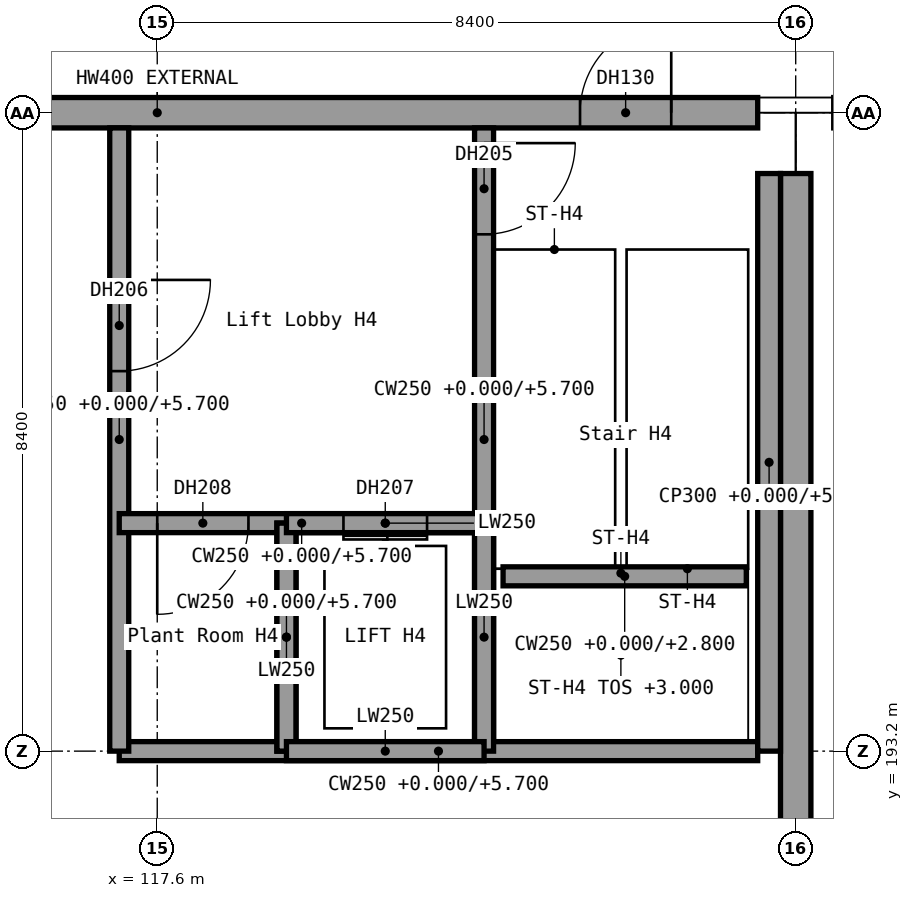
"""IFC4 building model, lengths in metres.
Left out: names, types, materials, properties, quantities, classifications, styles, units other than length and angle.
Written with IfcOpenShell. Run it as: python <this file> out.ifc"""

import sys

from ifc_helpers import new_model, si_unit, direction, frame, frame_2d, origin, origin_2d, place, context, subcontext, project, spatial, rectangle, extrude, element, fill, save


model = new_model("IFC4")
c1 = context("Model", 3, precision=1e-05, world=origin(), true_north=direction((0.0, 1.0)))
c2 = subcontext(c1, "Body", "Model", "MODEL_VIEW")
j1 = project(units=[si_unit("LENGTHUNIT", "METRE"), si_unit("PLANEANGLEUNIT", "RADIAN")], contexts=[c1])
p1 = place(None, origin())
s1 = spatial("IfcSite", under=j1, at=p1, CompositionType="ELEMENT")
p2 = place(p1, origin())
s2 = spatial("IfcBuilding", under=s1, at=p2, CompositionType="ELEMENT")
p3 = place(p2, origin())
s3 = spatial("IfcBuildingStorey", under=s2, at=p3, CompositionType="ELEMENT", Elevation=0.0)
p4 = place(p3, frame((126.0, 201.6, 0.0), z_axis=(0.0, 0.0, 1.0), x_axis=(1.0, 0.0, 0.0)))
e1 = element("IfcColumn", 1, at=p4, inside=s3, PredefinedType="COLUMN", context=c2, shape_type="SweptSolid", body=[
    extrude(rectangle(XDim=1.0, YDim=1.6, at=origin_2d()), origin(), (0.0, 0.0, 1.0), 6.0),
])
p5 = place(p3, frame((109.7, 201.6, 0.0), z_axis=(0.0, 0.0, 1.0), x_axis=(1.0, 0.0, 0.0)))
e2 = element("IfcWall", 2, at=p5, inside=s3, PredefinedType="STANDARD", context=c2, shape_type="SweptSolid", body=[
    extrude(rectangle(XDim=15.8, YDim=0.4, at=frame_2d((7.9, 0.0))), origin(), (0.0, 0.0, 1.0), 4.5),
])
p6 = place(p5, frame((13.462, 0.0, 0.0)))
e3 = element("IfcOpeningElement", 3, at=p6, cuts=e2, PredefinedType="OPENING", context=c2, shape_type="SweptSolid", body=[
    extrude(rectangle(XDim=1.2, YDim=2.1, at=frame_2d((0.6, 1.05))), frame((0.0, 0.2, 0.0), z_axis=(0.0, -1.0, 0.0), x_axis=(1.0, 0.0, 0.0)), (0.0, 0.0, 1.0), 0.4),
])
p7 = place(p5, frame((1.4, 0.0, 0.0)))
e4 = element("IfcOpeningElement", 4, at=p7, cuts=e2, PredefinedType="OPENING", context=c2, shape_type="SweptSolid", body=[
    extrude(rectangle(XDim=3.0, YDim=2.4, at=frame_2d((1.5, 1.2))), frame((0.0, 0.2, 0.0), z_axis=(0.0, -1.0, 0.0), x_axis=(1.0, 0.0, 0.0)), (0.0, 0.0, 1.0), 0.4),
])
p8 = place(p3, frame((126.0, 101.6, 0.0), z_axis=(0.0, 0.0, 1.0), x_axis=(0.0, 1.0, 0.0)))
e5 = element("IfcWall", 5, at=p8, inside=s3, PredefinedType="SHEAR", context=c2, shape_type="SweptSolid", body=[
    extrude(rectangle(XDim=99.2, YDim=0.4, at=frame_2d((49.6, 0.0))), origin(), (0.0, 0.0, 1.0), 6.0),
])
p9 = place(p8, frame((19.2, 0.0, 0.0)))
e6 = element("IfcOpeningElement", 6, at=p9, cuts=e5, PredefinedType="OPENING", context=c2, shape_type="SweptSolid", body=[
    extrude(rectangle(XDim=2.4, YDim=2.4, at=frame_2d((1.2, 1.2))), frame((0.0, 0.2, 0.0), z_axis=(0.0, -1.0, 0.0), x_axis=(1.0, 0.0, 0.0)), (0.0, 0.0, 1.0), 0.4),
])
p10 = place(p8, frame((39.2, 0.0, 0.0)))
e7 = element("IfcOpeningElement", 7, at=p10, cuts=e5, PredefinedType="OPENING", context=c2, shape_type="SweptSolid", body=[
    extrude(rectangle(XDim=2.4, YDim=2.4, at=frame_2d((1.2, 1.2))), frame((0.0, 0.2, 0.0), z_axis=(0.0, -1.0, 0.0), x_axis=(1.0, 0.0, 0.0)), (0.0, 0.0, 1.0), 0.4),
])
p11 = place(p8, frame((57.2, 0.0, 0.0)))
e8 = element("IfcOpeningElement", 8, at=p11, cuts=e5, PredefinedType="OPENING", context=c2, shape_type="SweptSolid", body=[
    extrude(rectangle(XDim=2.4, YDim=2.4, at=frame_2d((1.2, 1.2))), frame((0.0, 0.2, 0.0), z_axis=(0.0, -1.0, 0.0), x_axis=(1.0, 0.0, 0.0)), (0.0, 0.0, 1.0), 0.4),
])
p12 = place(p8, frame((77.2, 0.0, 0.0)))
e9 = element("IfcOpeningElement", 9, at=p12, cuts=e5, PredefinedType="OPENING", context=c2, shape_type="SweptSolid", body=[
    extrude(rectangle(XDim=2.4, YDim=2.4, at=frame_2d((1.2, 1.2))), frame((0.0, 0.2, 0.0), z_axis=(0.0, -1.0, 0.0), x_axis=(1.0, 0.0, 0.0)), (0.0, 0.0, 1.0), 0.4),
])
p13 = place(p3, frame((126.5, 201.6, 0.0), z_axis=(0.0, 0.0, 1.0), x_axis=(1.0, 0.0, 0.0)))
e10 = element("IfcWall", 10, at=p13, inside=s3, PredefinedType="SHEAR", context=c2, shape_type="SweptSolid", body=[
    extrude(rectangle(XDim=15.8, YDim=0.4, at=frame_2d((7.9, 0.0))), origin(), (0.0, 0.0, 1.0), 3.0),
])
p14 = place(p13, frame((2.5, 0.0, 0.0)))
e11 = element("IfcOpeningElement", 11, at=p14, cuts=e10, PredefinedType="OPENING", context=c2, shape_type="SweptSolid", body=[
    extrude(rectangle(XDim=2.4, YDim=2.4, at=frame_2d((1.2, 1.2))), frame((0.0, 0.2, 0.0), z_axis=(0.0, -1.0, 0.0), x_axis=(1.0, 0.0, 0.0)), (0.0, 0.0, 1.0), 0.4),
])
p15 = place(p13, frame((6.7, 0.0, 0.0)))
e12 = element("IfcOpeningElement", 12, at=p15, cuts=e10, PredefinedType="OPENING", context=c2, shape_type="SweptSolid", body=[
    extrude(rectangle(XDim=2.4, YDim=2.4, at=frame_2d((1.2, 1.2))), frame((0.0, 0.2, 0.0), z_axis=(0.0, -1.0, 0.0), x_axis=(1.0, 0.0, 0.0)), (0.0, 0.0, 1.0), 0.4),
])
p16 = place(p13, frame((10.9, 0.0, 0.0)))
e13 = element("IfcOpeningElement", 13, at=p16, cuts=e10, PredefinedType="OPENING", context=c2, shape_type="SweptSolid", body=[
    extrude(rectangle(XDim=2.4, YDim=2.4, at=frame_2d((1.2, 1.2))), frame((0.0, 0.2, 0.0), z_axis=(0.0, -1.0, 0.0), x_axis=(1.0, 0.0, 0.0)), (0.0, 0.0, 1.0), 0.4),
])
p17 = place(p3, frame((121.9, 201.4, 0.0), z_axis=(0.0, 0.0, 1.0), x_axis=(0.0, -1.0, 0.0)))
e14 = element("IfcWall", 14, at=p17, inside=s3, PredefinedType="SHEAR", context=c2, shape_type="SweptSolid", body=[
    extrude(rectangle(XDim=8.2, YDim=0.25, at=frame_2d((4.1, 0.0))), origin(), (0.0, 0.0, 1.0), 5.7),
])
p18 = place(p17, frame((0.2, 0.0, 0.0)))
e15 = element("IfcOpeningElement", 15, at=p18, cuts=e14, PredefinedType="OPENING", context=c2, shape_type="SweptSolid", body=[
    extrude(rectangle(XDim=1.2, YDim=2.1, at=frame_2d((0.6, 1.05))), frame((0.0, 0.125, 0.0), z_axis=(0.0, -1.0, 0.0), x_axis=(1.0, 0.0, 0.0)), (0.0, 0.0, 1.0), 0.25),
])
p19 = place(p3, frame((125.5, 193.2, 0.0), z_axis=(0.0, 0.0, 1.0), x_axis=(-1.0, 0.0, 0.0)))
e16 = element("IfcWall", 16, at=p19, inside=s3, PredefinedType="SHEAR", context=c2, shape_type="SweptSolid", body=[
    extrude(rectangle(XDim=8.4, YDim=0.25, at=frame_2d((4.2, 0.0))), origin(), (0.0, 0.0, 1.0), 5.7),
])
p20 = place(p3, frame((117.1, 201.4, 0.0), z_axis=(0.0, 0.0, 1.0), x_axis=(0.0, -1.0, 0.0)))
e17 = element("IfcWall", 17, at=p20, inside=s3, PredefinedType="SHEAR", context=c2, shape_type="SweptSolid", body=[
    extrude(rectangle(XDim=8.2, YDim=0.25, at=frame_2d((4.1, 0.0))), origin(), (0.0, 0.0, 1.0), 5.7),
])
p21 = place(p20, frame((2.0, 0.0, 0.0)))
e18 = element("IfcOpeningElement", 18, at=p21, cuts=e17, PredefinedType="OPENING", context=c2, shape_type="SweptSolid", body=[
    extrude(rectangle(XDim=1.2, YDim=2.1, at=frame_2d((0.6, 1.05))), frame((0.0, 0.125, 0.0), z_axis=(0.0, -1.0, 0.0), x_axis=(1.0, 0.0, 0.0)), (0.0, 0.0, 1.0), 0.25),
])
p22 = place(p3, frame((121.9, 196.2, 0.0), z_axis=(0.0, 0.0, 1.0), x_axis=(-1.0, 0.0, 0.0)))
e19 = element("IfcWall", 19, at=p22, inside=s3, PredefinedType="SHEAR", context=c2, shape_type="SweptSolid", body=[
    extrude(rectangle(XDim=4.8, YDim=0.25, at=frame_2d((2.4, 0.0))), origin(), (0.0, 0.0, 1.0), 5.7),
])
p23 = place(p22, frame((0.75, 0.0, 0.0)))
e20 = element("IfcOpeningElement", 20, at=p23, cuts=e19, PredefinedType="OPENING", context=c2, shape_type="SweptSolid", body=[
    extrude(rectangle(XDim=1.1, YDim=2.1, at=frame_2d((0.55, 1.05))), frame((0.0, 0.125, 0.0), z_axis=(0.0, -1.0, 0.0), x_axis=(1.0, 0.0, 0.0)), (0.0, 0.0, 1.0), 0.25),
])
p24 = place(p22, frame((3.1, 0.0, 0.0)))
e21 = element("IfcOpeningElement", 21, at=p24, cuts=e19, PredefinedType="OPENING", context=c2, shape_type="SweptSolid", body=[
    extrude(rectangle(XDim=1.2, YDim=2.1, at=frame_2d((0.6, 1.05))), frame((0.0, 0.125, 0.0), z_axis=(0.0, -1.0, 0.0), x_axis=(1.0, 0.0, 0.0)), (0.0, 0.0, 1.0), 0.25),
])
p25 = place(p3, frame((119.3, 196.2, 0.0), z_axis=(0.0, 0.0, 1.0), x_axis=(0.0, -1.0, 0.0)))
e22 = element("IfcWall", 22, at=p25, inside=s3, PredefinedType="SHEAR", context=c2, shape_type="SweptSolid", body=[
    extrude(rectangle(XDim=3.0, YDim=0.25, at=frame_2d((1.5, 0.0))), origin(), (0.0, 0.0, 1.0), 5.7),
])
p26 = place(p3, frame((125.65, 200.8, 0.0), z_axis=(0.0, 0.0, 1.0), x_axis=(0.0, -1.0, 0.0)))
e23 = element("IfcWall", 23, at=p26, inside=s3, PredefinedType="SHEAR", context=c2, shape_type="SweptSolid", body=[
    extrude(rectangle(XDim=7.6, YDim=0.3, at=frame_2d((3.8, 0.0))), origin(), (0.0, 0.0, 1.0), 5.7),
])
p27 = place(p3, frame((125.35, 195.5, 0.0), z_axis=(0.0, 0.0, 1.0), x_axis=(-1.0, 0.0, 0.0)))
e24 = element("IfcWall", 24, at=p27, inside=s3, PredefinedType="SHEAR", context=c2, shape_type="SweptSolid", body=[
    extrude(rectangle(XDim=3.2, YDim=0.25, at=frame_2d((1.6, 0.0))), origin(), (0.0, 0.0, 1.0), 2.8),
])
for number, where, z_axis, x_axis in (
    (25, (121.9, 196.2, -1.4), (0.0, 0.0, 1.0), (0.0, -1.0, 0.0)),
    (26, (119.3, 196.2, -1.4), (0.0, 0.0, 1.0), (0.0, -1.0, 0.0)),
):
    element("IfcWall", number, at=place(p3, frame(where, z_axis=z_axis, x_axis=x_axis)), inside=s3, PredefinedType="SHEAR", context=c2, shape_type="SweptSolid", body=[
        extrude(rectangle(XDim=3.0, YDim=0.25, at=frame_2d((1.5, 0.0))), origin(), (0.0, 0.0, 1.0), 1.4),
    ])
for number, where, z_axis, x_axis in (
    (27, (121.9, 196.2, -1.4), (0.0, 0.0, 1.0), (-1.0, 0.0, 0.0)),
    (28, (121.9, 193.2, -1.4), (0.0, 0.0, 1.0), (-1.0, 0.0, 0.0)),
):
    element("IfcWall", number, at=place(p3, frame(where, z_axis=z_axis, x_axis=x_axis)), inside=s3, PredefinedType="SHEAR", context=c2, shape_type="SweptSolid", body=[
        extrude(rectangle(XDim=2.6, YDim=0.25, at=frame_2d((1.3, 0.0))), origin(), (0.0, 0.0, 1.0), 1.4),
    ])
p28 = place(p6, origin())
e29 = element("IfcDoor", 29, at=p28, inside=s3, OperationType="SINGLE_SWING_RIGHT", PredefinedType="DOOR", context=c2, shape_type="SweptSolid", body=[
    extrude(rectangle(XDim=1.2, YDim=2.1, at=frame_2d((0.6, 1.05))), frame((0.0, 0.025, 0.0), z_axis=(0.0, -1.0, 0.0), x_axis=(1.0, 0.0, 0.0)), (0.0, 0.0, 1.0), 0.05),
])
fill(e3, e29)
p29 = place(p18, origin())
e30 = element("IfcDoor", 30, at=p29, inside=s3, OperationType="SINGLE_SWING_LEFT", PredefinedType="DOOR", context=c2, shape_type="SweptSolid", body=[
    extrude(rectangle(XDim=1.2, YDim=2.1, at=frame_2d((0.6, 1.05))), frame((0.0, 0.025, 0.0), z_axis=(0.0, -1.0, 0.0), x_axis=(1.0, 0.0, 0.0)), (0.0, 0.0, 1.0), 0.05),
])
fill(e15, e30)
p30 = place(p21, origin())
e31 = element("IfcDoor", 31, at=p30, inside=s3, OperationType="SINGLE_SWING_LEFT", PredefinedType="DOOR", context=c2, shape_type="SweptSolid", body=[
    extrude(rectangle(XDim=1.2, YDim=2.1, at=frame_2d((0.6, 1.05))), frame((0.0, 0.025, 0.0), z_axis=(0.0, -1.0, 0.0), x_axis=(1.0, 0.0, 0.0)), (0.0, 0.0, 1.0), 0.05),
])
fill(e18, e31)
p31 = place(p23, origin())
e32 = element("IfcDoor", 32, at=p31, inside=s3, OperationType="DOUBLE_DOOR_SLIDING", PredefinedType="DOOR", context=c2, shape_type="SweptSolid", body=[
    extrude(rectangle(XDim=1.1, YDim=2.1, at=frame_2d((0.55, 1.05))), frame((0.0, 0.025, 0.0), z_axis=(0.0, -1.0, 0.0), x_axis=(1.0, 0.0, 0.0)), (0.0, 0.0, 1.0), 0.05),
])
fill(e20, e32)
p32 = place(p24, origin())
e33 = element("IfcDoor", 33, at=p32, inside=s3, OperationType="SINGLE_SWING_RIGHT", PredefinedType="DOOR", context=c2, shape_type="SweptSolid", body=[
    extrude(rectangle(XDim=1.2, YDim=2.1, at=frame_2d((0.6, 1.05))), frame((0.0, 0.025, 0.0), z_axis=(0.0, -1.0, 0.0), x_axis=(1.0, 0.0, 0.0)), (0.0, 0.0, 1.0), 0.05),
])
fill(e21, e33)
save(model, sys.argv[1])
